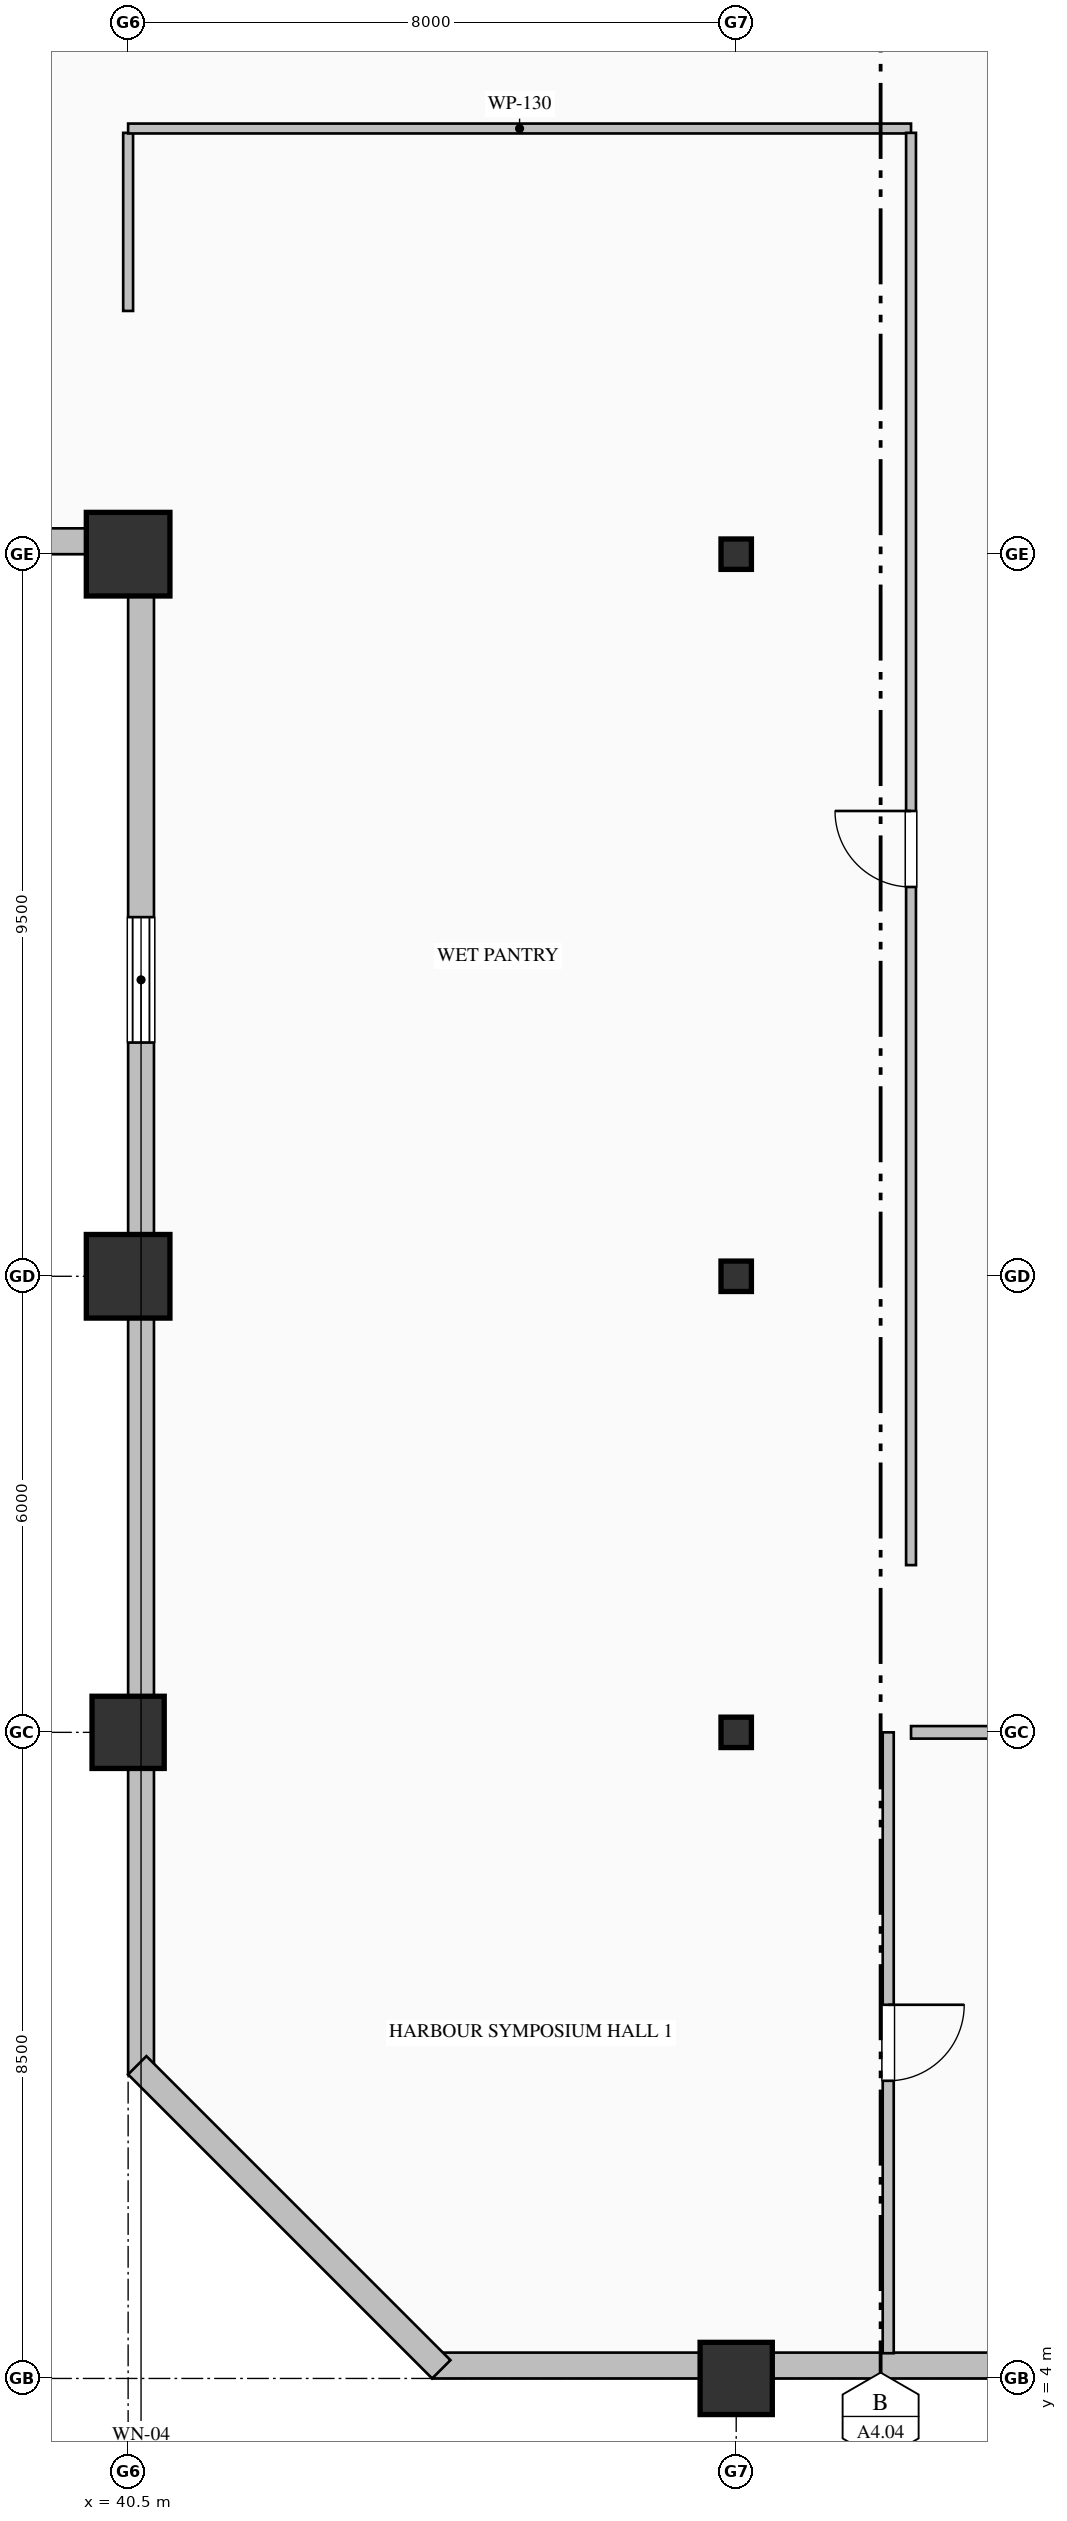
"""IFC4 building model, lengths in metres.
Left out: names, types, materials, properties, quantities, classifications, styles, units other than length and angle.
Written with IfcOpenShell. Run it as: python <this file> out.ifc"""

import sys

from ifc_helpers import new_model, si_unit, direction, frame, frame_2d, origin, origin_2d, place, context, subcontext, project, spatial, rectangle, hollow_rectangle, i_section, extrude, element, fill, save


model = new_model("IFC4")
c1 = context("Model", 3, precision=1e-05, world=origin(), true_north=direction((0.0, 1.0)))
c2 = subcontext(c1, "Body", "Model", "MODEL_VIEW")
j1 = project(units=[si_unit("LENGTHUNIT", "METRE"), si_unit("PLANEANGLEUNIT", "RADIAN")], contexts=[c1])
p1 = place(None, origin())
s1 = spatial("IfcSite", under=j1, at=p1, CompositionType="ELEMENT")
p2 = place(p1, origin())
s2 = spatial("IfcBuilding", under=s1, at=p2, CompositionType="ELEMENT")
p3 = place(p2, frame((0.0, 0.0, 143.0)))
s3 = spatial("IfcBuildingStorey", under=s2, at=p3, CompositionType="ELEMENT", Elevation=143.0)
p4 = place(p3, frame((40.5, 12.5, 0.0), z_axis=(0.0, 0.0, 1.0), x_axis=(1.0, 0.0, 0.0)))
e1 = element("IfcColumn", 1, at=p4, inside=s3, PredefinedType="COLUMN", context=c2, shape_type="SweptSolid", body=[
    extrude(hollow_rectangle(XDim=0.95, YDim=0.95, WallThickness=0.036, at=origin_2d()), origin(), (0.0, 0.0, 1.0), 4.0),
])
for number, where, z_axis, x_axis in (
    (2, (40.5, 18.5, 0.0), (0.0, 0.0, 1.0), (1.0, 0.0, 0.0)),
    (3, (40.5, 28.0, 0.0), (0.0, 0.0, 1.0), (1.0, 0.0, 0.0)),
):
    element("IfcColumn", number, at=place(p3, frame(where, z_axis=z_axis, x_axis=x_axis)), inside=s3, PredefinedType="COLUMN", context=c2, shape_type="SweptSolid", body=[
        extrude(hollow_rectangle(XDim=1.1, YDim=1.1, WallThickness=0.04, at=origin_2d()), origin(), (0.0, 0.0, 1.0), 4.0),
    ])
p5 = place(p3, frame((48.5, 4.0, 0.0), z_axis=(0.0, 0.0, 1.0), x_axis=(1.0, 0.0, 0.0)))
e4 = element("IfcColumn", 4, at=p5, inside=s3, PredefinedType="COLUMN", context=c2, shape_type="SweptSolid", body=[
    extrude(hollow_rectangle(XDim=0.95, YDim=0.95, WallThickness=0.036, at=origin_2d()), origin(), (0.0, 0.0, 1.0), 4.0),
])
for number, where, z_axis, x_axis in (
    (5, (48.5, 12.5, 0.0), (0.0, 0.0, 1.0), (1.0, 0.0, 0.0)),
    (6, (48.5, 18.5, 0.0), (0.0, 0.0, 1.0), (1.0, 0.0, 0.0)),
    (7, (48.5, 28.0, 0.0), (0.0, 0.0, 1.0), (1.0, 0.0, 0.0)),
):
    element("IfcColumn", number, at=place(p3, frame(where, z_axis=z_axis, x_axis=x_axis)), inside=s3, PredefinedType="COLUMN", context=c2, shape_type="SweptSolid", body=[
        extrude(i_section(OverallWidth=0.4, OverallDepth=0.4, WebThickness=0.013, FlangeThickness=0.021, FilletRadius=0.022, at=origin_2d()), origin(), (0.0, 0.0, 1.0), 4.0),
    ])
p6 = place(p3, frame((40.67, 8.0, 0.0), z_axis=(0.0, 0.0, 1.0), x_axis=(0.0, 1.0, 0.0)))
e8 = element("IfcWall", 8, at=p6, inside=s3, PredefinedType="SOLIDWALL", context=c2, shape_type="SweptSolid", body=[
    extrude(rectangle(XDim=20.34, YDim=0.34, at=frame_2d((10.17, 0.0))), origin(), (0.0, 0.0, 1.0), 3.165),
])
p7 = place(p6, frame((13.575, 0.0, 0.85)))
e9 = element("IfcOpeningElement", 9, at=p7, cuts=e8, PredefinedType="OPENING", context=c2, shape_type="SweptSolid", body=[
    extrude(rectangle(XDim=1.65, YDim=1.95, at=frame_2d((0.825, 0.975))), frame((0.0, 0.18, 0.0), z_axis=(0.0, -1.0, 0.0), x_axis=(1.0, 0.0, 0.0)), (0.0, 0.0, 1.0), 0.36),
])
p8 = place(p3, frame((40.52, 28.17, 0.0), z_axis=(0.0, 0.0, 1.0), x_axis=(-1.0, 0.0, 0.0)))
e10 = element("IfcWall", 10, at=p8, inside=s3, PredefinedType="SOLIDWALL", context=c2, shape_type="SweptSolid", body=[
    extrude(rectangle(XDim=27.52, YDim=0.34, at=frame_2d((13.76, 0.0))), origin(), (0.0, 0.0, 1.0), 3.165),
])
p9 = place(p8, frame((3.0, 0.0, 0.7)))
e11 = element("IfcOpeningElement", 11, at=p9, cuts=e10, PredefinedType="OPENING", context=c2, shape_type="SweptSolid", body=[
    extrude(rectangle(XDim=1.2, YDim=1.85, at=frame_2d((0.6, 0.925))), frame((0.0, 0.18, 0.0), z_axis=(0.0, -1.0, 0.0), x_axis=(1.0, 0.0, 0.0)), (0.0, 0.0, 1.0), 0.36),
])
p10 = place(p8, frame((9.975, 0.0, 0.85)))
e12 = element("IfcOpeningElement", 12, at=p10, cuts=e10, PredefinedType="OPENING", context=c2, shape_type="SweptSolid", body=[
    extrude(rectangle(XDim=1.65, YDim=1.95, at=frame_2d((0.825, 0.975))), frame((0.0, 0.18, 0.0), z_axis=(0.0, -1.0, 0.0), x_axis=(1.0, 0.0, 0.0)), (0.0, 0.0, 1.0), 0.36),
])
p11 = place(p8, frame((13.8, 0.0, 0.7)))
e13 = element("IfcOpeningElement", 13, at=p11, cuts=e10, PredefinedType="OPENING", context=c2, shape_type="SweptSolid", body=[
    extrude(rectangle(XDim=1.2, YDim=1.85, at=frame_2d((0.6, 0.925))), frame((0.0, 0.18, 0.0), z_axis=(0.0, -1.0, 0.0), x_axis=(1.0, 0.0, 0.0)), (0.0, 0.0, 1.0), 0.36),
])
p12 = place(p8, frame((17.25, 0.0, 0.85)))
e14 = element("IfcOpeningElement", 14, at=p12, cuts=e10, PredefinedType="OPENING", context=c2, shape_type="SweptSolid", body=[
    extrude(rectangle(XDim=1.5, YDim=1.95, at=frame_2d((0.75, 0.975))), frame((0.0, 0.18, 0.0), z_axis=(0.0, -1.0, 0.0), x_axis=(1.0, 0.0, 0.0)), (0.0, 0.0, 1.0), 0.36),
])
p13 = place(p8, frame((20.775, 0.0, 0.85)))
e15 = element("IfcOpeningElement", 15, at=p13, cuts=e10, PredefinedType="OPENING", context=c2, shape_type="SweptSolid", body=[
    extrude(rectangle(XDim=1.65, YDim=1.95, at=frame_2d((0.825, 0.975))), frame((0.0, 0.18, 0.0), z_axis=(0.0, -1.0, 0.0), x_axis=(1.0, 0.0, 0.0)), (0.0, 0.0, 1.0), 0.36),
])
p14 = place(p3, frame((60.0, 4.17, 0.0), z_axis=(0.0, 0.0, 1.0), x_axis=(-1.0, 0.0, 0.0)))
e16 = element("IfcWall", 16, at=p14, inside=s3, PredefinedType="SOLIDWALL", context=c2, shape_type="SweptSolid", body=[
    extrude(rectangle(XDim=15.5, YDim=0.34, at=frame_2d((7.75, 0.0))), origin(), (0.0, 0.0, 1.0), 3.265),
])
p15 = place(p14, frame((6.375, 0.0, 0.85)))
e17 = element("IfcOpeningElement", 17, at=p15, cuts=e16, PredefinedType="OPENING", context=c2, shape_type="SweptSolid", body=[
    extrude(rectangle(XDim=1.65, YDim=1.95, at=frame_2d((0.825, 0.975))), frame((0.0, 0.18, 0.0), z_axis=(0.0, -1.0, 0.0), x_axis=(1.0, 0.0, 0.0)), (0.0, 0.0, 1.0), 0.36),
])
p16 = place(p3, frame((44.62, 4.12, 0.0), z_axis=(0.0, 0.0, 1.0), x_axis=(-0.707106781187, 0.707106781187, 0.0)))
e18 = element("IfcWall", 18, at=p16, inside=s3, PredefinedType="SOLIDWALL", context=c2, shape_type="SweptSolid", body=[
    extrude(rectangle(XDim=5.657, YDim=0.34, at=frame_2d((2.828, 0.0))), origin(), (0.0, 0.0, 1.0), 3.765),
])
p17 = place(p3, frame((40.5, 33.543, 0.0), z_axis=(0.0, 0.0, 1.0), x_axis=(0.0, -1.0, 0.0)))
e19 = element("IfcWall", 19, at=p17, inside=s3, PredefinedType="PARTITIONING", context=c2, shape_type="SweptSolid", body=[
    extrude(rectangle(XDim=2.343, YDim=0.13, at=frame_2d((1.171, 0.0))), origin(), (0.0, 0.0, 1.0), 3.157),
])
p18 = place(p3, frame((50.8, 33.6, 0.0), z_axis=(0.0, 0.0, 1.0), x_axis=(-1.0, 0.0, 0.0)))
e20 = element("IfcWall", 20, at=p18, inside=s3, PredefinedType="PARTITIONING", context=c2, shape_type="SweptSolid", body=[
    extrude(rectangle(XDim=10.3, YDim=0.13, at=frame_2d((5.15, 0.0))), origin(), (0.0, 0.0, 1.0), 3.765),
])
p19 = place(p3, frame((50.8, 14.7, 0.0), z_axis=(0.0, 0.0, 1.0), x_axis=(0.0, 1.0, 0.0)))
e21 = element("IfcWall", 21, at=p19, inside=s3, PredefinedType="PARTITIONING", context=c2, shape_type="SweptSolid", body=[
    extrude(rectangle(XDim=18.843, YDim=0.13, at=frame_2d((9.421, 0.0))), origin(), (0.0, 0.0, 1.0), 3.765),
])
p20 = place(p19, frame((8.921, 0.0, 0.0)))
e22 = element("IfcOpeningElement", 22, at=p20, cuts=e21, PredefinedType="OPENING", context=c2, shape_type="SweptSolid", body=[
    extrude(rectangle(XDim=1.0, YDim=2.15, at=frame_2d((0.5, 1.075))), frame((0.0, 0.075, 0.0), z_axis=(0.0, -1.0, 0.0), x_axis=(1.0, 0.0, 0.0)), (0.0, 0.0, 1.0), 0.15),
])
p21 = place(p3, frame((53.0, 12.5, 0.0), z_axis=(0.0, 0.0, 1.0), x_axis=(-1.0, 0.0, 0.0)))
e23 = element("IfcWall", 23, at=p21, inside=s3, PredefinedType="PARTITIONING", context=c2, shape_type="SweptSolid", body=[
    extrude(rectangle(XDim=2.2, YDim=0.165, at=frame_2d((1.1, 0.0))), origin(), (0.0, 0.0, 1.0), 3.157),
])
p22 = place(p3, frame((50.5, 12.5, 0.0), z_axis=(0.0, 0.0, 1.0), x_axis=(0.0, -1.0, 0.0)))
e24 = element("IfcWall", 24, at=p22, inside=s3, PredefinedType="PARTITIONING", context=c2, shape_type="SweptSolid", body=[
    extrude(rectangle(XDim=8.168, YDim=0.145, at=frame_2d((4.084, 0.0))), origin(), (0.0, 0.0, 1.0), 3.765),
])
p23 = place(p22, frame((3.584, 0.0, 0.0)))
e25 = element("IfcOpeningElement", 25, at=p23, cuts=e24, PredefinedType="OPENING", context=c2, shape_type="SweptSolid", body=[
    extrude(rectangle(XDim=1.0, YDim=2.15, at=frame_2d((0.5, 1.075))), frame((0.0, 0.083, 0.0), z_axis=(0.0, -1.0, 0.0), x_axis=(1.0, 0.0, 0.0)), (0.0, 0.0, 1.0), 0.165),
])
p24 = place(p7, origin())
e26 = element("IfcWindow", 26, at=p24, inside=s3, PartitioningType="DOUBLE_PANEL_VERTICAL", PredefinedType="WINDOW", context=c2, shape_type="SweptSolid", body=[
    extrude(rectangle(XDim=1.65, YDim=1.95, at=frame_2d((0.825, 0.975))), frame((0.0, 0.15, 0.0), z_axis=(0.0, -1.0, 0.0), x_axis=(1.0, 0.0, 0.0)), (0.0, 0.0, 1.0), 0.06),
])
fill(e9, e26)
p25 = place(p20, origin())
e27 = element("IfcDoor", 27, at=p25, inside=s3, OperationType="SINGLE_SWING_RIGHT", PredefinedType="DOOR", context=c2, shape_type="SweptSolid", body=[
    extrude(rectangle(XDim=1.0, YDim=2.15, at=frame_2d((0.5, 1.075))), frame((0.0, 0.025, 0.0), z_axis=(0.0, -1.0, 0.0), x_axis=(1.0, 0.0, 0.0)), (0.0, 0.0, 1.0), 0.05),
])
fill(e22, e27)
p26 = place(p23, origin())
e28 = element("IfcDoor", 28, at=p26, inside=s3, OperationType="SINGLE_SWING_LEFT", PredefinedType="DOOR", context=c2, shape_type="SweptSolid", body=[
    extrude(rectangle(XDim=1.0, YDim=2.15, at=frame_2d((0.5, 1.075))), frame((0.0, 0.025, 0.0), z_axis=(0.0, -1.0, 0.0), x_axis=(1.0, 0.0, 0.0)), (0.0, 0.0, 1.0), 0.05),
])
fill(e25, e28)
save(model, sys.argv[1])
